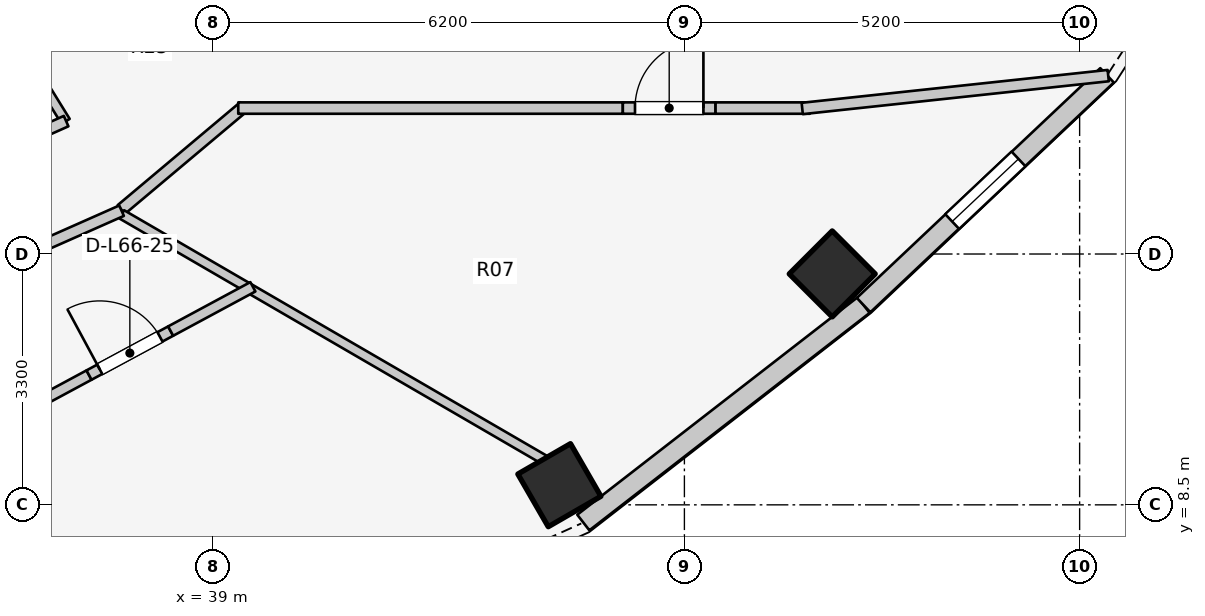
"""IFC4 building model, lengths in metres.
Left out: names, types, materials, properties, quantities, classifications, styles, units other than length and angle.
Written with IfcOpenShell. Run it as: python <this file> out.ifc"""

import sys

from ifc_helpers import new_model, si_unit, direction, frame, frame_2d, origin, origin_2d, place, context, subcontext, project, spatial, rectangle, extrude, element, fill, save


model = new_model("IFC4")
c1 = context("Model", 3, precision=1e-05, world=origin(), true_north=direction((0.0, 1.0)))
c2 = subcontext(c1, "Body", "Model", "MODEL_VIEW")
j1 = project(units=[si_unit("LENGTHUNIT", "METRE"), si_unit("PLANEANGLEUNIT", "RADIAN")], contexts=[c1])
p1 = place(None, origin())
s1 = spatial("IfcSite", under=j1, at=p1, CompositionType="ELEMENT")
p2 = place(p1, origin())
s2 = spatial("IfcBuilding", under=s1, at=p2, CompositionType="ELEMENT")
p3 = place(p2, frame((0.0, 0.0, 217.1)))
s3 = spatial("IfcBuildingStorey", under=s2, at=p3, CompositionType="ELEMENT", Elevation=217.1)
for number, where, z_axis, x_axis in (
    (1, (43.555, 8.759, 0.0), (0.0, 0.0, 1.0), (0.5, -0.866, 0.0)),
    (2, (47.145, 11.538, 0.0), (0.0, 0.0, 1.0), (0.707, -0.707, 0.0)),
):
    element("IfcColumn", number, at=place(p3, frame(where, z_axis=z_axis, x_axis=x_axis)), inside=s3, PredefinedType="COLUMN", context=c2, shape_type="SweptSolid", body=[
        extrude(rectangle(XDim=0.8, YDim=0.8, at=origin_2d()), origin(), (0.0, 0.0, 1.0), 3.1),
    ])
p4 = place(p3, frame((43.87, 8.267, 0.0), z_axis=(0.0, 0.0, 1.0), x_axis=(0.790126214723, 0.612944177563, 0.0)))
e3 = element("IfcWall", 3, at=p4, inside=s3, PredefinedType="STANDARD", context=c2, shape_type="SweptSolid", body=[
    extrude(rectangle(XDim=4.667, YDim=0.26, at=frame_2d((2.333, 0.0))), origin(), (0.0, 0.0, 1.0), 1.22),
])
p5 = place(p3, frame((47.558, 11.128, 0.0), z_axis=(0.0, 0.0, 1.0), x_axis=(0.72731899451, 0.686299555752, 0.0)))
e4 = element("IfcWall", 4, at=p5, inside=s3, PredefinedType="STANDARD", context=c2, shape_type="SweptSolid", body=[
    extrude(rectangle(XDim=4.404, YDim=0.26, at=frame_2d((2.202, 0.0))), origin(), (0.0, 0.0, 1.0), 1.22),
])
p6 = place(p5, frame((1.602, 0.0, 0.15)))
e5 = element("IfcOpeningElement", 5, at=p6, cuts=e4, PredefinedType="OPENING", context=c2, shape_type="SweptSolid", body=[
    extrude(rectangle(XDim=1.2, YDim=0.9, at=frame_2d((0.6, 0.45))), frame((0.0, 0.14, 0.0), z_axis=(0.0, -1.0, 0.0), x_axis=(1.0, 0.0, 0.0)), (0.0, 0.0, 1.0), 0.28),
])
p7 = place(p3, frame((35.55, 15.985, 0.0), z_axis=(0.0, 0.0, 1.0), x_axis=(0.52592395012, -0.850531597702, 0.0)))
e6 = element("IfcWall", 6, at=p7, inside=s3, PredefinedType="PARTITIONING", context=c2, shape_type="SweptSolid", body=[
    extrude(rectangle(XDim=2.869, YDim=0.125, at=frame_2d((1.435, 0.0))), origin(), (0.0, 0.0, 1.0), 1.22),
])
p8 = place(p3, frame((36.63, 13.354, 0.0), z_axis=(0.0, 0.0, 1.0), x_axis=(0.9128584484, 0.40827619718, 0.0)))
e7 = element("IfcWall", 7, at=p8, inside=s3, PredefinedType="PARTITIONING", context=c2, shape_type="SweptSolid", body=[
    extrude(rectangle(XDim=0.477, YDim=0.15, at=frame_2d((0.238, 0.0))), origin(), (0.0, 0.0, 1.0), 2.575),
])
p9 = place(p3, frame((37.791, 12.385, 0.0), z_axis=(0.0, 0.0, 1.0), x_axis=(0.765677451641, 0.643224719711, 0.0)))
e8 = element("IfcWall", 8, at=p9, inside=s3, PredefinedType="PARTITIONING", context=c2, shape_type="SweptSolid", body=[
    extrude(rectangle(XDim=2.105, YDim=0.15, at=frame_2d((1.053, 0.0))), origin(), (0.0, 0.0, 1.0), 1.22),
])
p10 = place(p3, frame((39.33, 13.72, 0.0), z_axis=(0.0, 0.0, 1.0), x_axis=(1.0, 0.0, 0.0)))
e9 = element("IfcWall", 9, at=p10, inside=s3, PredefinedType="PARTITIONING", context=c2, shape_type="SweptSolid", body=[
    extrude(rectangle(XDim=5.06, YDim=0.15, at=frame_2d((2.53, 0.0))), origin(), (0.0, 0.0, 1.0), 1.22),
])
p11 = place(p3, frame((44.39, 13.72, 0.0), z_axis=(0.0, 0.0, 1.0), x_axis=(1.0, 0.0, 0.0)))
e10 = element("IfcWall", 10, at=p11, inside=s3, PredefinedType="PARTITIONING", context=c2, shape_type="SweptSolid", body=[
    extrude(rectangle(XDim=1.22, YDim=0.15, at=frame_2d((0.61, 0.0))), origin(), (0.0, 0.0, 1.0), 2.575),
])
p12 = place(p11, frame((0.16, 0.0, 0.0)))
e11 = element("IfcOpeningElement", 11, at=p12, cuts=e10, PredefinedType="OPENING", context=c2, shape_type="SweptSolid", body=[
    extrude(rectangle(XDim=0.9, YDim=2.1, at=frame_2d((0.45, 1.05))), frame((0.0, 0.085, 0.0), z_axis=(0.0, -1.0, 0.0), x_axis=(1.0, 0.0, 0.0)), (0.0, 0.0, 1.0), 0.17),
])
p13 = place(p3, frame((45.61, 13.72, 0.0), z_axis=(0.0, 0.0, 1.0), x_axis=(1.0, 0.0, 0.0)))
e12 = element("IfcWall", 12, at=p13, inside=s3, PredefinedType="PARTITIONING", context=c2, shape_type="SweptSolid", body=[
    extrude(rectangle(XDim=1.24, YDim=0.15, at=frame_2d((0.62, 0.0))), origin(), (0.0, 0.0, 1.0), 2.575),
])
p14 = place(p3, frame((46.75, 13.715, 0.0), z_axis=(0.0, 0.0, 1.0), x_axis=(0.994275802046, 0.106843949134, 0.0)))
e13 = element("IfcWall", 13, at=p14, inside=s3, PredefinedType="PARTITIONING", context=c2, shape_type="SweptSolid", body=[
    extrude(rectangle(XDim=4.049, YDim=0.15, at=frame_2d((2.024, 0.0))), origin(), (0.0, 0.0, 1.0), 1.22),
])
p15 = place(p3, frame((37.797, 12.322, 0.0), z_axis=(0.0, 0.0, 1.0), x_axis=(0.864712462127, -0.502267217567, 0.0)))
e14 = element("IfcWall", 14, at=p15, inside=s3, PredefinedType="PARTITIONING", context=c2, shape_type="SweptSolid", body=[
    extrude(rectangle(XDim=6.439, YDim=0.125, at=frame_2d((3.22, 0.0))), origin(), (0.0, 0.0, 1.0), 1.22),
])
p16 = place(p3, frame((34.93, 11.101, 0.0), z_axis=(0.0, 0.0, 1.0), x_axis=(0.914264054844, 0.405118794949, 0.0)))
e15 = element("IfcWall", 15, at=p16, inside=s3, PredefinedType="PARTITIONING", context=c2, shape_type="SweptSolid", body=[
    extrude(rectangle(XDim=3.133, YDim=0.15, at=frame_2d((1.566, 0.0))), origin(), (0.0, 0.0, 1.0), 1.22),
])
p17 = place(p3, frame((36.285, 9.625, 0.0), z_axis=(0.0, 0.0, 1.0), x_axis=(0.880381766321, 0.474265690862, 0.0)))
e16 = element("IfcWall", 16, at=p17, inside=s3, PredefinedType="PLUMBINGWALL", context=c2, shape_type="SweptSolid", body=[
    extrude(rectangle(XDim=1.229, YDim=0.14, at=frame_2d((0.614, 0.0))), origin(), (0.0, 0.0, 1.0), 1.22),
])
p18 = place(p3, frame((37.367, 10.207, 0.0), z_axis=(0.0, 0.0, 1.0), x_axis=(0.880361832518, 0.474302692218, 0.0)))
e17 = element("IfcWall", 17, at=p18, inside=s3, PredefinedType="PLUMBINGWALL", context=c2, shape_type="SweptSolid", body=[
    extrude(rectangle(XDim=1.22, YDim=0.14, at=frame_2d((0.61, 0.0))), origin(), (0.0, 0.0, 1.0), 2.575),
])
p19 = place(p18, frame((0.16, 0.0, 0.0)))
e18 = element("IfcOpeningElement", 18, at=p19, cuts=e17, PredefinedType="OPENING", context=c2, shape_type="SweptSolid", body=[
    extrude(rectangle(XDim=0.9, YDim=2.1, at=frame_2d((0.45, 1.05))), frame((0.0, 0.08, 0.0), z_axis=(0.0, -1.0, 0.0), x_axis=(1.0, 0.0, 0.0)), (0.0, 0.0, 1.0), 0.16),
])
p20 = place(p3, frame((38.441, 10.786, 0.0), z_axis=(0.0, 0.0, 1.0), x_axis=(0.880298801954, 0.474419665779, 0.0)))
e19 = element("IfcWall", 19, at=p20, inside=s3, PredefinedType="PLUMBINGWALL", context=c2, shape_type="SweptSolid", body=[
    extrude(rectangle(XDim=1.229, YDim=0.14, at=frame_2d((0.615, 0.0))), origin(), (0.0, 0.0, 1.0), 2.575),
])
p21 = place(p6, origin())
e20 = element("IfcWindow", 20, at=p21, inside=s3, PartitioningType="SINGLE_PANEL", PredefinedType="WINDOW", context=c2, shape_type="SweptSolid", body=[
    extrude(rectangle(XDim=1.2, YDim=0.9, at=frame_2d((0.6, 0.45))), frame((0.0, 0.03, 0.0), z_axis=(0.0, -1.0, 0.0), x_axis=(1.0, 0.0, 0.0)), (0.0, 0.0, 1.0), 0.06),
])
fill(e5, e20)
p22 = place(p12, origin())
e21 = element("IfcDoor", 21, at=p22, inside=s3, OperationType="SINGLE_SWING_RIGHT", PredefinedType="DOOR", context=c2, shape_type="SweptSolid", body=[
    extrude(rectangle(XDim=0.9, YDim=2.1, at=frame_2d((0.45, 1.05))), frame((0.0, 0.025, 0.0), z_axis=(0.0, -1.0, 0.0), x_axis=(1.0, 0.0, 0.0)), (0.0, 0.0, 1.0), 0.05),
])
fill(e11, e21)
p23 = place(p19, origin())
e22 = element("IfcDoor", 22, at=p23, inside=s3, OperationType="SINGLE_SWING_LEFT", PredefinedType="DOOR", context=c2, shape_type="SweptSolid", body=[
    extrude(rectangle(XDim=0.9, YDim=2.1, at=frame_2d((0.45, 1.05))), frame((0.0, 0.025, 0.0), z_axis=(0.0, -1.0, 0.0), x_axis=(1.0, 0.0, 0.0)), (0.0, 0.0, 1.0), 0.05),
])
fill(e18, e22)
save(model, sys.argv[1])
